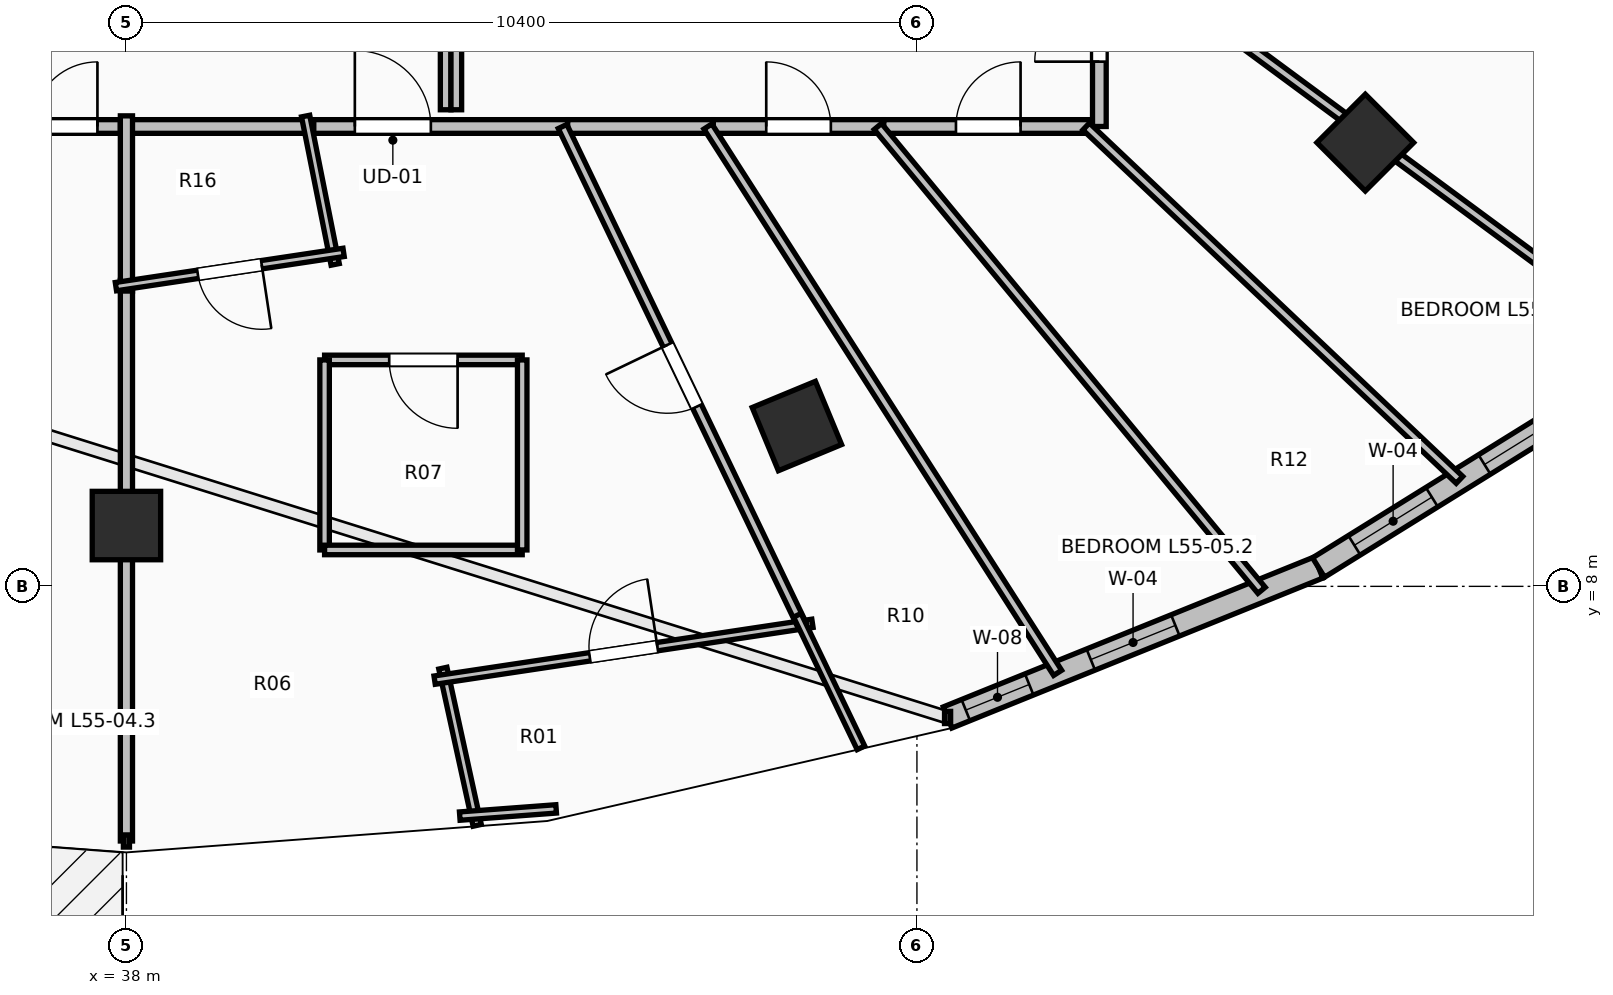
"""IFC4 building model, lengths in metres.
Left out: names, types, materials, properties, quantities, classifications, styles, units other than length and angle.
Written with IfcOpenShell. Run it as: python <this file> out.ifc"""

import sys

from ifc_helpers import new_model, si_unit, direction, frame, frame_2d, origin, origin_2d, place, context, subcontext, project, spatial, rectangle, extrude, element, fill, save


model = new_model("IFC4")
c1 = context("Model", 3, precision=1e-05, world=origin(), true_north=direction((0.0, 1.0)))
c2 = subcontext(c1, "Body", "Model", "MODEL_VIEW")
j1 = project(units=[si_unit("LENGTHUNIT", "METRE"), si_unit("PLANEANGLEUNIT", "RADIAN")], contexts=[c1])
p1 = place(None, origin())
s1 = spatial("IfcSite", under=j1, at=p1, CompositionType="ELEMENT")
p2 = place(p1, origin())
s2 = spatial("IfcBuilding", under=s1, at=p2, CompositionType="ELEMENT")
p3 = place(p2, frame((0.0, 0.0, 203.65)))
s3 = spatial("IfcBuildingStorey", under=s2, at=p3, CompositionType="ELEMENT", Elevation=203.65)
for number, where, z_axis, x_axis in (
    (1, (38.0, 8.8, 0.0), (0.0, 0.0, 1.0), (0.0, -1.0, 0.0)),
    (2, (46.821, 10.109, 0.0), (0.0, 0.0, 1.0), (0.383, -0.924, 0.0)),
    (3, (54.299, 13.838, 0.0), (0.0, 0.0, 1.0), (0.707, -0.707, 0.0)),
):
    element("IfcColumn", number, at=place(p3, frame(where, z_axis=z_axis, x_axis=x_axis)), inside=s3, PredefinedType="COLUMN", context=c2, shape_type="SweptSolid", body=[
        extrude(rectangle(XDim=0.9, YDim=0.9, at=origin_2d()), origin(), (0.0, 0.0, 1.0), 3.55),
    ])
p4 = place(p3, frame((48.803, 6.275, 0.0), z_axis=(0.0, 0.0, 1.0), x_axis=(0.927111094334, 0.374786630981, 0.0)))
e4 = element("IfcWall", 4, at=p4, inside=s3, PredefinedType="STANDARD", context=c2, shape_type="SweptSolid", body=[
    extrude(rectangle(XDim=5.264, YDim=0.3, at=frame_2d((2.632, 0.0))), origin(), (0.0, 0.0, 1.0), 3.29),
])
p5 = place(p4, frame((0.258, 0.0, 0.85)))
e5 = element("IfcOpeningElement", 5, at=p5, cuts=e4, PredefinedType="OPENING", context=c2, shape_type="SweptSolid", body=[
    extrude(rectangle(XDim=0.9, YDim=1.8, at=frame_2d((0.45, 0.9))), frame((0.0, 0.165, 0.0), z_axis=(0.0, -1.0, 0.0), x_axis=(1.0, 0.0, 0.0)), (0.0, 0.0, 1.0), 0.33),
])
p6 = place(p4, frame((2.032, 0.0, 0.85)))
e6 = element("IfcOpeningElement", 6, at=p6, cuts=e4, PredefinedType="OPENING", context=c2, shape_type="SweptSolid", body=[
    extrude(rectangle(XDim=1.2, YDim=1.95, at=frame_2d((0.6, 0.975))), frame((0.0, 0.165, 0.0), z_axis=(0.0, -1.0, 0.0), x_axis=(1.0, 0.0, 0.0)), (0.0, 0.0, 1.0), 0.33),
])
p7 = place(p3, frame((53.684, 8.248, 0.0), z_axis=(0.0, 0.0, 1.0), x_axis=(0.849647657754, 0.527350791858, 0.0)))
e7 = element("IfcWall", 7, at=p7, inside=s3, PredefinedType="STANDARD", context=c2, shape_type="SweptSolid", body=[
    extrude(rectangle(XDim=5.035, YDim=0.3, at=frame_2d((2.518, 0.0))), origin(), (0.0, 0.0, 1.0), 3.29),
])
p8 = place(p7, frame((0.555, 0.0, 0.85)))
e8 = element("IfcOpeningElement", 8, at=p8, cuts=e7, PredefinedType="OPENING", context=c2, shape_type="SweptSolid", body=[
    extrude(rectangle(XDim=1.2, YDim=1.95, at=frame_2d((0.6, 0.975))), frame((0.0, 0.165, 0.0), z_axis=(0.0, -1.0, 0.0), x_axis=(1.0, 0.0, 0.0)), (0.0, 0.0, 1.0), 0.33),
])
p9 = place(p7, frame((2.569, 0.0, 0.85)))
e9 = element("IfcOpeningElement", 9, at=p9, cuts=e7, PredefinedType="OPENING", context=c2, shape_type="SweptSolid", body=[
    extrude(rectangle(XDim=1.2, YDim=1.95, at=frame_2d((0.6, 0.975))), frame((0.0, 0.165, 0.0), z_axis=(0.0, -1.0, 0.0), x_axis=(1.0, 0.0, 0.0)), (0.0, 0.0, 1.0), 0.33),
])
p10 = place(p3, frame((36.327, 14.05, 0.0), z_axis=(0.0, 0.0, 1.0), x_axis=(1.0, 0.0, 0.0)))
e10 = element("IfcWall", 10, at=p10, inside=s3, PredefinedType="PARTITIONING", context=c2, shape_type="SweptSolid", body=[
    extrude(rectangle(XDim=1.733, YDim=0.18, at=frame_2d((0.867, 0.0))), origin(), (0.0, 0.0, 1.0), 2.936),
])
p11 = place(p10, frame((0.441, 0.0, 0.0)))
e11 = element("IfcOpeningElement", 11, at=p11, cuts=e10, PredefinedType="OPENING", context=c2, shape_type="SweptSolid", body=[
    extrude(rectangle(XDim=0.85, YDim=2.1, at=frame_2d((0.425, 1.05))), frame((0.0, 0.105, 0.0), z_axis=(0.0, -1.0, 0.0), x_axis=(1.0, 0.0, 0.0)), (0.0, 0.0, 1.0), 0.21),
])
p12 = place(p3, frame((40.325, 14.05, 0.0), z_axis=(0.0, 0.0, 1.0), x_axis=(1.0, 0.0, 0.0)))
e12 = element("IfcWall", 12, at=p12, inside=s3, PredefinedType="PARTITIONING", context=c2, shape_type="SweptSolid", body=[
    extrude(rectangle(XDim=3.48, YDim=0.18, at=frame_2d((1.74, 0.0))), origin(), (0.0, 0.0, 1.0), 2.936),
])
p13 = place(p12, frame((0.68, 0.0, 0.0)))
e13 = element("IfcOpeningElement", 13, at=p13, cuts=e12, PredefinedType="OPENING", context=c2, shape_type="SweptSolid", body=[
    extrude(rectangle(XDim=1.0, YDim=2.15, at=frame_2d((0.5, 1.075))), frame((0.0, 0.105, 0.0), z_axis=(0.0, -1.0, 0.0), x_axis=(1.0, 0.0, 0.0)), (0.0, 0.0, 1.0), 0.21),
])
p14 = place(p3, frame((37.92, 14.05, 0.0), z_axis=(0.0, 0.0, 1.0), x_axis=(1.0, 0.0, 0.0)))
e14 = element("IfcWall", 14, at=p14, inside=s3, PredefinedType="PARTITIONING", context=c2, shape_type="SweptSolid", body=[
    extrude(rectangle(XDim=2.545, YDim=0.18, at=frame_2d((1.272, 0.0))), origin(), (0.0, 0.0, 1.0), 2.936),
])
p15 = place(p3, frame((43.805, 14.05, 0.0), z_axis=(0.0, 0.0, 1.0), x_axis=(1.0, 0.0, 0.0)))
e15 = element("IfcWall", 15, at=p15, inside=s3, PredefinedType="PARTITIONING", context=c2, shape_type="SweptSolid", body=[
    extrude(rectangle(XDim=1.916, YDim=0.18, at=frame_2d((0.958, 0.0))), origin(), (0.0, 0.0, 1.0), 2.482),
])
p16 = place(p3, frame((45.721, 14.05, 0.0), z_axis=(0.0, 0.0, 1.0), x_axis=(1.0, 0.0, 0.0)))
e16 = element("IfcWall", 16, at=p16, inside=s3, PredefinedType="PARTITIONING", context=c2, shape_type="SweptSolid", body=[
    extrude(rectangle(XDim=2.243, YDim=0.18, at=frame_2d((1.122, 0.0))), origin(), (0.0, 0.0, 1.0), 2.482),
])
p17 = place(p16, frame((0.697, 0.0, 0.0)))
e17 = element("IfcOpeningElement", 17, at=p17, cuts=e16, PredefinedType="OPENING", context=c2, shape_type="SweptSolid", body=[
    extrude(rectangle(XDim=0.85, YDim=2.1, at=frame_2d((0.425, 1.05))), frame((0.0, 0.105, 0.0), z_axis=(0.0, -1.0, 0.0), x_axis=(1.0, 0.0, 0.0)), (0.0, 0.0, 1.0), 0.21),
])
p18 = place(p3, frame((47.964, 14.05, 0.0), z_axis=(0.0, 0.0, 1.0), x_axis=(1.0, 0.0, 0.0)))
e18 = element("IfcWall", 18, at=p18, inside=s3, PredefinedType="PARTITIONING", context=c2, shape_type="SweptSolid", body=[
    extrude(rectangle(XDim=2.749, YDim=0.18, at=frame_2d((1.375, 0.0))), origin(), (0.0, 0.0, 1.0), 2.482),
])
p19 = place(p18, frame((0.949, 0.0, 0.0)))
e19 = element("IfcOpeningElement", 19, at=p19, cuts=e18, PredefinedType="OPENING", context=c2, shape_type="SweptSolid", body=[
    extrude(rectangle(XDim=0.85, YDim=2.1, at=frame_2d((0.425, 1.05))), frame((0.0, 0.105, 0.0), z_axis=(0.0, -1.0, 0.0), x_axis=(1.0, 0.0, 0.0)), (0.0, 0.0, 1.0), 0.21),
])
p20 = place(p3, frame((50.8, 14.05, 0.0), z_axis=(0.0, 0.0, 1.0), x_axis=(0.0, 1.0, 0.0)))
e20 = element("IfcWall", 20, at=p20, inside=s3, PredefinedType="PARTITIONING", context=c2, shape_type="SweptSolid", body=[
    extrude(rectangle(XDim=2.556, YDim=0.18, at=frame_2d((1.278, 0.0))), origin(), (0.0, 0.0, 1.0), 2.482),
])
p21 = place(p20, frame((0.853, 0.0, 0.0)))
e21 = element("IfcOpeningElement", 21, at=p21, cuts=e20, PredefinedType="OPENING", context=c2, shape_type="SweptSolid", body=[
    extrude(rectangle(XDim=0.85, YDim=2.1, at=frame_2d((0.425, 1.05))), frame((0.0, 0.105, 0.0), z_axis=(0.0, -1.0, 0.0), x_axis=(1.0, 0.0, 0.0)), (0.0, 0.0, 1.0), 0.21),
])
p22 = place(p3, frame((38.0, 4.65, 0.0), z_axis=(0.0, 0.0, 1.0), x_axis=(0.0, 1.0, 0.0)))
e22 = element("IfcWall", 22, at=p22, inside=s3, PredefinedType="PARTITIONING", context=c2, shape_type="SweptSolid", body=[
    extrude(rectangle(XDim=7.375, YDim=0.16, at=frame_2d((3.688, 0.0))), origin(), (0.0, 0.0, 1.0), 3.022),
])
p23 = place(p3, frame((38.0, 11.885, 0.0), z_axis=(0.0, 0.0, 1.0), x_axis=(0.0, 1.0, 0.0)))
e23 = element("IfcWall", 23, at=p23, inside=s3, PredefinedType="PARTITIONING", context=c2, shape_type="SweptSolid", body=[
    extrude(rectangle(XDim=2.305, YDim=0.16, at=frame_2d((1.152, 0.0))), origin(), (0.0, 0.0, 1.0), 2.936),
])
p24 = place(p3, frame((40.358, 14.187, 0.0), z_axis=(0.0, 0.0, 1.0), x_axis=(0.195313900905, -0.980740781304, 0.0)))
e24 = element("IfcWall", 24, at=p24, inside=s3, PredefinedType="PARTITIONING", context=c2, shape_type="SweptSolid", body=[
    extrude(rectangle(XDim=1.99, YDim=0.11, at=frame_2d((0.995, 0.0))), origin(), (0.0, 0.0, 1.0), 2.936),
])
p25 = place(p3, frame((40.857, 12.394, 0.0), z_axis=(0.0, 0.0, 1.0), x_axis=(-0.988873015636, -0.148762088409, 0.0)))
e25 = element("IfcWall", 25, at=p25, inside=s3, PredefinedType="PARTITIONING", context=c2, shape_type="SweptSolid", body=[
    extrude(rectangle(XDim=3.03, YDim=0.11, at=frame_2d((1.515, 0.0))), origin(), (0.0, 0.0, 1.0), 3.29),
])
p26 = place(p25, frame((1.09, 0.0, 0.0)))
e26 = element("IfcOpeningElement", 26, at=p26, cuts=e25, PredefinedType="OPENING", context=c2, shape_type="SweptSolid", body=[
    extrude(rectangle(XDim=0.85, YDim=2.1, at=frame_2d((0.425, 1.05))), frame((0.0, 0.07, 0.0), z_axis=(0.0, -1.0, 0.0), x_axis=(1.0, 0.0, 0.0)), (0.0, 0.0, 1.0), 0.14),
])
p27 = place(p3, frame((42.615, 4.856, 0.0), z_axis=(0.0, 0.0, 1.0), x_axis=(-0.213521424511, 0.976938381514, 0.0)))
e27 = element("IfcWall", 27, at=p27, inside=s3, PredefinedType="PARTITIONING", context=c2, shape_type="SweptSolid", body=[
    extrude(rectangle(XDim=2.116, YDim=0.11, at=frame_2d((1.058, 0.0))), origin(), (0.0, 0.0, 1.0), 3.29),
])
p28 = place(p3, frame((42.055, 6.766, 0.0), z_axis=(0.0, 0.0, 1.0), x_axis=(0.988872134662, 0.148767944424, 0.0)))
e28 = element("IfcWall", 28, at=p28, inside=s3, PredefinedType="PARTITIONING", context=c2, shape_type="SweptSolid", body=[
    extrude(rectangle(XDim=5.027, YDim=0.11, at=frame_2d((2.513, 0.0))), origin(), (0.0, 0.0, 1.0), 3.29),
])
p29 = place(p28, frame((2.063, 0.0, 0.0)))
e29 = element("IfcOpeningElement", 29, at=p29, cuts=e28, PredefinedType="OPENING", context=c2, shape_type="SweptSolid", body=[
    extrude(rectangle(XDim=0.9, YDim=2.1, at=frame_2d((0.45, 1.05))), frame((0.0, 0.07, 0.0), z_axis=(0.0, -1.0, 0.0), x_axis=(1.0, 0.0, 0.0)), (0.0, 0.0, 1.0), 0.14),
])
p30 = place(p3, frame((42.385, 4.978, 0.0), z_axis=(0.0, 0.0, 1.0), x_axis=(0.997207179737, 0.074684942803, 0.0)))
e30 = element("IfcWall", 30, at=p30, inside=s3, PredefinedType="PARTITIONING", context=c2, shape_type="SweptSolid", body=[
    extrude(rectangle(XDim=1.272, YDim=0.11, at=frame_2d((0.636, 0.0))), origin(), (0.0, 0.0, 1.0), 3.29),
])
p31 = place(p3, frame((43.207, 10.979, 0.0), z_axis=(0.0, 0.0, 1.0), x_axis=(-1.0, 0.0, 0.0)))
e31 = element("IfcWall", 31, at=p31, inside=s3, PredefinedType="PARTITIONING", context=c2, shape_type="SweptSolid", body=[
    extrude(rectangle(XDim=2.6, YDim=0.125, at=frame_2d((1.3, 0.0))), origin(), (0.0, 0.0, 1.0), 2.482),
])
p32 = place(p31, frame((0.85, 0.0, 0.0)))
e32 = element("IfcOpeningElement", 32, at=p32, cuts=e31, PredefinedType="OPENING", context=c2, shape_type="SweptSolid", body=[
    extrude(rectangle(XDim=0.9, YDim=2.1, at=frame_2d((0.45, 1.05))), frame((0.0, 0.077, 0.0), z_axis=(0.0, -1.0, 0.0), x_axis=(1.0, 0.0, 0.0)), (0.0, 0.0, 1.0), 0.155),
])
p33 = place(p3, frame((40.607, 10.979, 0.0), z_axis=(0.0, 0.0, 1.0), x_axis=(0.0, -1.0, 0.0)))
e33 = element("IfcWall", 33, at=p33, inside=s3, PredefinedType="PARTITIONING", context=c2, shape_type="SweptSolid", body=[
    extrude(rectangle(XDim=2.5, YDim=0.125, at=frame_2d((1.25, 0.0))), origin(), (0.0, 0.0, 1.0), 2.482),
])
p34 = place(p3, frame((40.607, 8.479, 0.0), z_axis=(0.0, 0.0, 1.0), x_axis=(1.0, 0.0, 0.0)))
e34 = element("IfcWall", 34, at=p34, inside=s3, PredefinedType="PARTITIONING", context=c2, shape_type="SweptSolid", body=[
    extrude(rectangle(XDim=2.6, YDim=0.125, at=frame_2d((1.3, 0.0))), origin(), (0.0, 0.0, 1.0), 3.29),
])
p35 = place(p3, frame((43.207, 8.479, 0.0), z_axis=(0.0, 0.0, 1.0), x_axis=(0.0, 1.0, 0.0)))
e35 = element("IfcWall", 35, at=p35, inside=s3, PredefinedType="PARTITIONING", context=c2, shape_type="SweptSolid", body=[
    extrude(rectangle(XDim=2.5, YDim=0.125, at=frame_2d((1.25, 0.0))), origin(), (0.0, 0.0, 1.0), 2.824),
])
p36 = place(p3, frame((46.887, 7.493, 0.0), z_axis=(0.0, 0.0, 1.0), x_axis=(-0.43289909466, 0.901442385204, 0.0)))
e36 = element("IfcWall", 36, at=p36, inside=s3, PredefinedType="PARTITIONING", context=c2, shape_type="SweptSolid", body=[
    extrude(rectangle(XDim=7.274, YDim=0.125, at=frame_2d((3.637, 0.0))), origin(), (0.0, 0.0, 1.0), 2.482),
])
p37 = place(p36, frame((3.187, 0.0, 0.0)))
e37 = element("IfcOpeningElement", 37, at=p37, cuts=e36, PredefinedType="OPENING", context=c2, shape_type="SweptSolid", body=[
    extrude(rectangle(XDim=0.9, YDim=2.1, at=frame_2d((0.45, 1.05))), frame((0.0, 0.077, 0.0), z_axis=(0.0, -1.0, 0.0), x_axis=(1.0, 0.0, 0.0)), (0.0, 0.0, 1.0), 0.155),
])
p38 = place(p3, frame((47.664, 5.876, 0.0), z_axis=(0.0, 0.0, 1.0), x_axis=(-0.432866492457, 0.901458041014, 0.0)))
e38 = element("IfcWall", 38, at=p38, inside=s3, PredefinedType="PARTITIONING", context=c2, shape_type="SweptSolid", body=[
    extrude(rectangle(XDim=1.934, YDim=0.11, at=frame_2d((0.967, 0.0))), origin(), (0.0, 0.0, 1.0), 3.29),
])
p39 = place(p3, frame((50.251, 6.862, 0.0), z_axis=(0.0, 0.0, 1.0), x_axis=(-0.539117012224, 0.842230875194, 0.0)))
e39 = element("IfcWall", 39, at=p39, inside=s3, PredefinedType="PARTITIONING", context=c2, shape_type="SweptSolid", body=[
    extrude(rectangle(XDim=8.534, YDim=0.125, at=frame_2d((4.267, 0.0))), origin(), (0.0, 0.0, 1.0), 2.482),
])
p40 = place(p3, frame((52.934, 7.948, 0.0), z_axis=(0.0, 0.0, 1.0), x_axis=(-0.637427009283, 0.77051074479, 0.0)))
e40 = element("IfcWall", 40, at=p40, inside=s3, PredefinedType="PARTITIONING", context=c2, shape_type="SweptSolid", body=[
    extrude(rectangle(XDim=7.919, YDim=0.125, at=frame_2d((3.96, 0.0))), origin(), (0.0, 0.0, 1.0), 2.482),
])
p41 = place(p3, frame((55.538, 9.401, 0.0), z_axis=(0.0, 0.0, 1.0), x_axis=(-0.726277952769, 0.687401145854, 0.0)))
e41 = element("IfcWall", 41, at=p41, inside=s3, PredefinedType="PARTITIONING", context=c2, shape_type="SweptSolid", body=[
    extrude(rectangle(XDim=6.763, YDim=0.125, at=frame_2d((3.382, 0.0))), origin(), (0.0, 0.0, 1.0), 2.824),
])
p42 = place(p3, frame((58.174, 11.099, 0.0), z_axis=(0.0, 0.0, 1.0), x_axis=(-0.804363169868, 0.594137939338, 0.0)))
e42 = element("IfcWall", 42, at=p42, inside=s3, PredefinedType="PARTITIONING", context=c2, shape_type="SweptSolid", body=[
    extrude(rectangle(XDim=9.167, YDim=0.125, at=frame_2d((4.584, 0.0))), origin(), (0.0, 0.0, 1.0), 2.482),
])
p43 = place(p3, frame((60.524, 13.269, 0.0), z_axis=(0.0, 0.0, 1.0), x_axis=(-0.870572608778, 0.49203997078, 0.0)))
e43 = element("IfcWall", 43, at=p43, inside=s3, PredefinedType="PARTITIONING", context=c2, shape_type="SweptSolid", body=[
    extrude(rectangle(XDim=11.169, YDim=0.125, at=frame_2d((5.585, 0.0))), origin(), (0.0, 0.0, 1.0), 2.824),
])
for number, where, z_axis, x_axis in (
    (44, (42.2, 16.1, 0.0), (0.0, 0.0, 1.0), (0.0, -1.0, 0.0)),
    (45, (42.34, 14.27, 0.0), (0.0, 0.0, 1.0), (0.0, 1.0, 0.0)),
):
    element("IfcWall", number, at=place(p3, frame(where, z_axis=z_axis, x_axis=x_axis)), inside=s3, PredefinedType="PARTITIONING", context=c2, shape_type="SweptSolid", body=[
        extrude(rectangle(XDim=1.83, YDim=0.14, at=frame_2d((0.915, 0.0))), origin(), (0.0, 0.0, 1.0), 3.29),
    ])
p44 = place(p5, origin())
e46 = element("IfcWindow", 46, at=p44, inside=s3, PartitioningType="SINGLE_PANEL", PredefinedType="WINDOW", context=c2, shape_type="SweptSolid", body=[
    extrude(rectangle(XDim=0.9, YDim=1.8, at=frame_2d((0.45, 0.9))), frame((0.0, 0.03, 0.0), z_axis=(0.0, -1.0, 0.0), x_axis=(1.0, 0.0, 0.0)), (0.0, 0.0, 1.0), 0.06),
])
fill(e5, e46)
p45 = place(p6, origin())
e47 = element("IfcWindow", 47, at=p45, inside=s3, PartitioningType="SINGLE_PANEL", PredefinedType="WINDOW", context=c2, shape_type="SweptSolid", body=[
    extrude(rectangle(XDim=1.2, YDim=1.95, at=frame_2d((0.6, 0.975))), frame((0.0, 0.03, 0.0), z_axis=(0.0, -1.0, 0.0), x_axis=(1.0, 0.0, 0.0)), (0.0, 0.0, 1.0), 0.06),
])
fill(e6, e47)
p46 = place(p8, origin())
e48 = element("IfcWindow", 48, at=p46, inside=s3, PartitioningType="SINGLE_PANEL", PredefinedType="WINDOW", context=c2, shape_type="SweptSolid", body=[
    extrude(rectangle(XDim=1.2, YDim=1.95, at=frame_2d((0.6, 0.975))), frame((0.0, 0.03, 0.0), z_axis=(0.0, -1.0, 0.0), x_axis=(1.0, 0.0, 0.0)), (0.0, 0.0, 1.0), 0.06),
])
fill(e8, e48)
p47 = place(p9, origin())
e49 = element("IfcWindow", 49, at=p47, inside=s3, PartitioningType="SINGLE_PANEL", PredefinedType="WINDOW", context=c2, shape_type="SweptSolid", body=[
    extrude(rectangle(XDim=1.2, YDim=1.95, at=frame_2d((0.6, 0.975))), frame((0.0, 0.03, 0.0), z_axis=(0.0, -1.0, 0.0), x_axis=(1.0, 0.0, 0.0)), (0.0, 0.0, 1.0), 0.06),
])
fill(e9, e49)
p48 = place(p13, origin())
e50 = element("IfcDoor", 50, at=p48, inside=s3, OperationType="SINGLE_SWING_LEFT", PredefinedType="DOOR", context=c2, shape_type="SweptSolid", body=[
    extrude(rectangle(XDim=1.0, YDim=2.15, at=frame_2d((0.5, 1.075))), frame((0.0, 0.025, 0.0), z_axis=(0.0, -1.0, 0.0), x_axis=(1.0, 0.0, 0.0)), (0.0, 0.0, 1.0), 0.05),
])
fill(e13, e50)
p49 = place(p26, origin())
e51 = element("IfcDoor", 51, at=p49, inside=s3, OperationType="SINGLE_SWING_LEFT", PredefinedType="DOOR", context=c2, shape_type="SweptSolid", body=[
    extrude(rectangle(XDim=0.85, YDim=2.1, at=frame_2d((0.425, 1.05))), frame((0.0, 0.025, 0.0), z_axis=(0.0, -1.0, 0.0), x_axis=(1.0, 0.0, 0.0)), (0.0, 0.0, 1.0), 0.05),
])
fill(e26, e51)
p50 = place(p29, origin())
e52 = element("IfcDoor", 52, at=p50, inside=s3, OperationType="SINGLE_SWING_RIGHT", PredefinedType="DOOR", context=c2, shape_type="SweptSolid", body=[
    extrude(rectangle(XDim=0.9, YDim=2.1, at=frame_2d((0.45, 1.05))), frame((0.0, 0.025, 0.0), z_axis=(0.0, -1.0, 0.0), x_axis=(1.0, 0.0, 0.0)), (0.0, 0.0, 1.0), 0.05),
])
fill(e29, e52)
p51 = place(p32, origin())
e53 = element("IfcDoor", 53, at=p51, inside=s3, OperationType="SINGLE_SWING_LEFT", PredefinedType="DOOR", context=c2, shape_type="SweptSolid", body=[
    extrude(rectangle(XDim=0.9, YDim=2.1, at=frame_2d((0.45, 1.05))), frame((0.0, 0.025, 0.0), z_axis=(0.0, -1.0, 0.0), x_axis=(1.0, 0.0, 0.0)), (0.0, 0.0, 1.0), 0.05),
])
fill(e32, e53)
p52 = place(p37, origin())
e54 = element("IfcDoor", 54, at=p52, inside=s3, OperationType="SINGLE_SWING_RIGHT", PredefinedType="DOOR", context=c2, shape_type="SweptSolid", body=[
    extrude(rectangle(XDim=0.9, YDim=2.1, at=frame_2d((0.45, 1.05))), frame((0.0, 0.025, 0.0), z_axis=(0.0, -1.0, 0.0), x_axis=(1.0, 0.0, 0.0)), (0.0, 0.0, 1.0), 0.05),
])
fill(e37, e54)
p53 = place(p11, origin())
e55 = element("IfcDoor", 55, at=p53, inside=s3, OperationType="SINGLE_SWING_RIGHT", PredefinedType="DOOR", context=c2, shape_type="SweptSolid", body=[
    extrude(rectangle(XDim=0.85, YDim=2.1, at=frame_2d((0.425, 1.05))), frame((0.0, 0.025, 0.0), z_axis=(0.0, -1.0, 0.0), x_axis=(1.0, 0.0, 0.0)), (0.0, 0.0, 1.0), 0.05),
])
fill(e11, e55)
p54 = place(p17, origin())
e56 = element("IfcDoor", 56, at=p54, inside=s3, OperationType="SINGLE_SWING_LEFT", PredefinedType="DOOR", context=c2, shape_type="SweptSolid", body=[
    extrude(rectangle(XDim=0.85, YDim=2.1, at=frame_2d((0.425, 1.05))), frame((0.0, 0.025, 0.0), z_axis=(0.0, -1.0, 0.0), x_axis=(1.0, 0.0, 0.0)), (0.0, 0.0, 1.0), 0.05),
])
fill(e17, e56)
p55 = place(p19, origin())
e57 = element("IfcDoor", 57, at=p55, inside=s3, OperationType="SINGLE_SWING_RIGHT", PredefinedType="DOOR", context=c2, shape_type="SweptSolid", body=[
    extrude(rectangle(XDim=0.85, YDim=2.1, at=frame_2d((0.425, 1.05))), frame((0.0, 0.025, 0.0), z_axis=(0.0, -1.0, 0.0), x_axis=(1.0, 0.0, 0.0)), (0.0, 0.0, 1.0), 0.05),
])
fill(e19, e57)
p56 = place(p21, origin())
e58 = element("IfcDoor", 58, at=p56, inside=s3, OperationType="SINGLE_SWING_LEFT", PredefinedType="DOOR", context=c2, shape_type="SweptSolid", body=[
    extrude(rectangle(XDim=0.85, YDim=2.1, at=frame_2d((0.425, 1.05))), frame((0.0, 0.025, 0.0), z_axis=(0.0, -1.0, 0.0), x_axis=(1.0, 0.0, 0.0)), (0.0, 0.0, 1.0), 0.05),
])
fill(e21, e58)
save(model, sys.argv[1])
